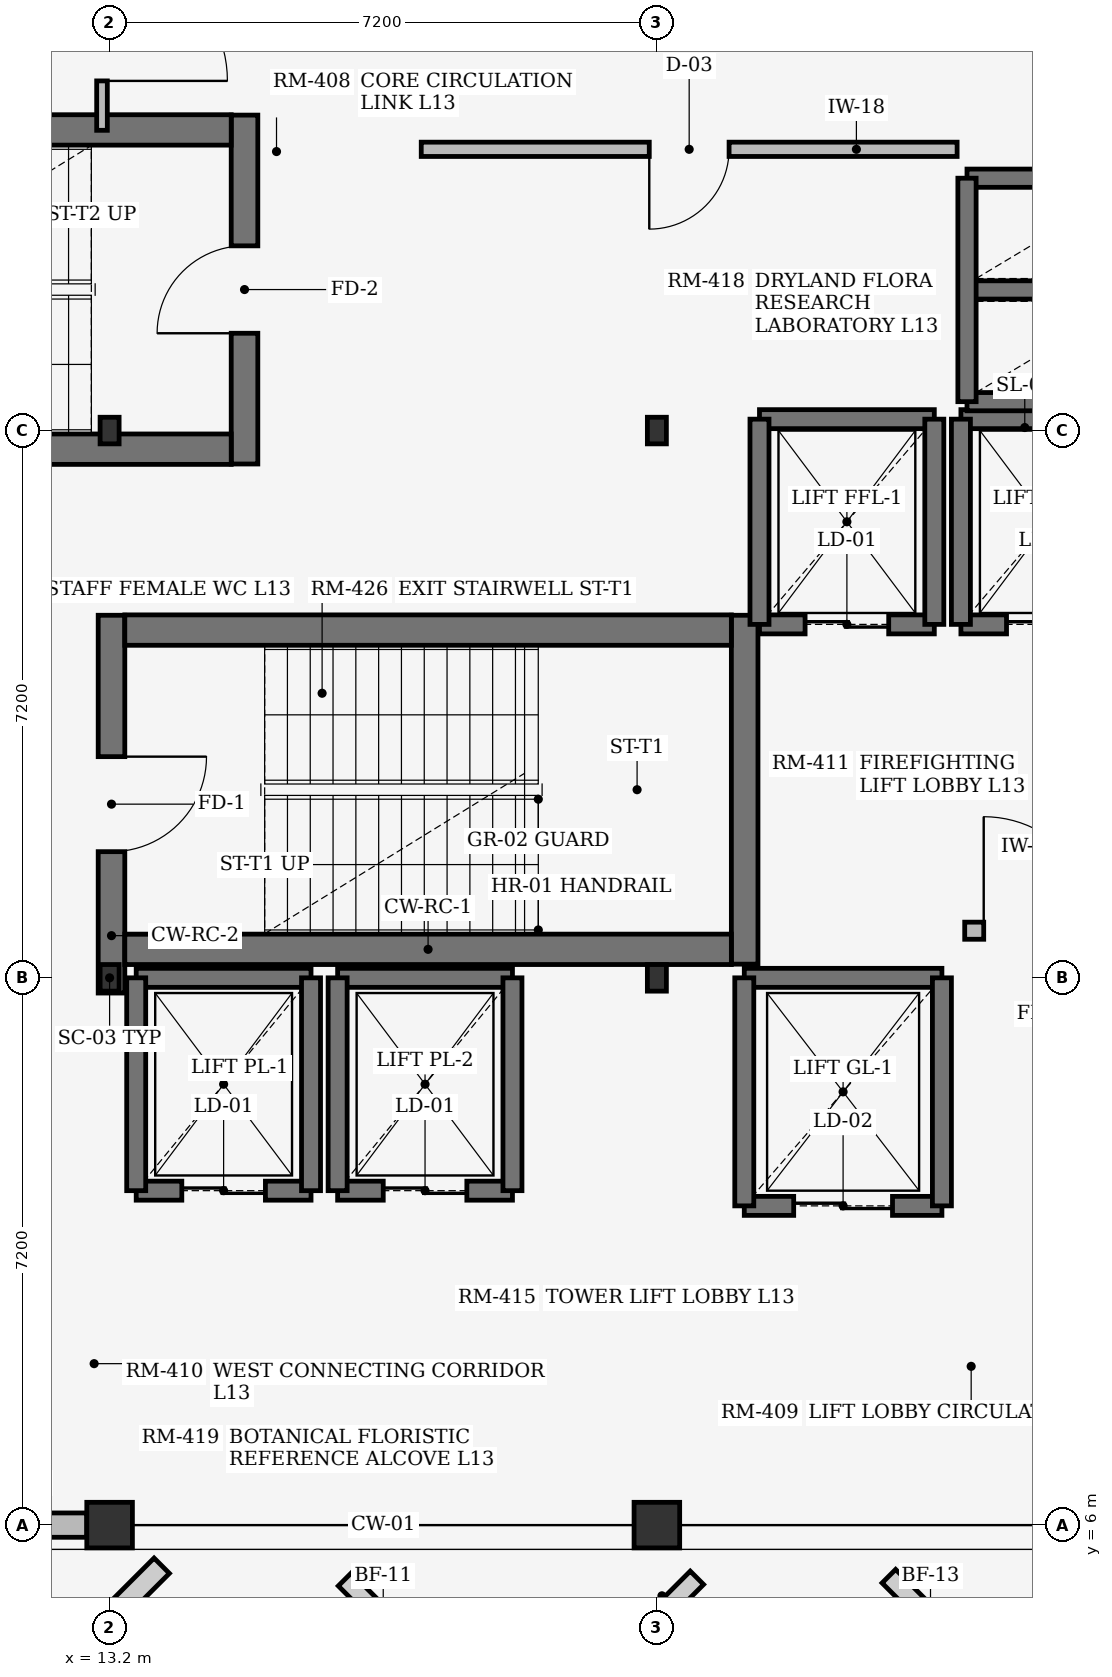
"""IFC4 building model, lengths in metres.
Left out: names, types, materials, properties, quantities, classifications, styles, units other than length and angle.
Written with IfcOpenShell. Run it as: python <this file> out.ifc"""

import sys

from ifc_helpers import new_model, si_unit, direction, frame, frame_2d, origin, origin_2d, place, context, subcontext, project, spatial, rectangle, i_section, extrude, element, fill, save


model = new_model("IFC4")
c1 = context("Model", 3, precision=1e-05, world=origin(), true_north=direction((0.0, 1.0)))
c2 = subcontext(c1, "Body", "Model", "MODEL_VIEW")
j1 = project(units=[si_unit("LENGTHUNIT", "METRE"), si_unit("PLANEANGLEUNIT", "RADIAN")], contexts=[c1])
p1 = place(None, origin())
s1 = spatial("IfcSite", under=j1, at=p1, CompositionType="ELEMENT")
p2 = place(p1, origin())
s2 = spatial("IfcBuilding", under=s1, at=p2, CompositionType="ELEMENT")
p3 = place(p2, frame((0.0, 0.0, 52.2)))
s3 = spatial("IfcBuildingStorey", under=s2, at=p3, CompositionType="ELEMENT", Elevation=52.2)
p4 = place(p3, frame((13.2, 6.0, 0.0), z_axis=(0.0, 0.0, 1.0), x_axis=(1.0, 0.0, 0.0)))
e1 = element("IfcColumn", 1, at=p4, inside=s3, PredefinedType="COLUMN", context=c2, shape_type="SweptSolid", body=[
    extrude(rectangle(XDim=0.6, YDim=0.6, at=origin_2d()), origin(), (0.0, 0.0, 1.0), 3.705),
])
for number, where, z_axis, x_axis in (
    (2, (13.2, 13.2, 0.0), (0.0, 0.0, 1.0), (1.0, 0.0, 0.0)),
    (3, (13.2, 20.4, 0.0), (0.0, 0.0, 1.0), (1.0, 0.0, 0.0)),
):
    element("IfcColumn", number, at=place(p3, frame(where, z_axis=z_axis, x_axis=x_axis)), inside=s3, PredefinedType="COLUMN", context=c2, shape_type="SweptSolid", body=[
        extrude(i_section(OverallWidth=0.25, OverallDepth=0.35, WebThickness=0.01, FlangeThickness=0.012, at=origin_2d()), origin(), (0.0, 0.0, 1.0), 3.705),
    ])
p5 = place(p3, frame((20.4, 6.0, 0.0), z_axis=(0.0, 0.0, 1.0), x_axis=(1.0, 0.0, 0.0)))
e4 = element("IfcColumn", 4, at=p5, inside=s3, PredefinedType="COLUMN", context=c2, shape_type="SweptSolid", body=[
    extrude(rectangle(XDim=0.6, YDim=0.6, at=origin_2d()), origin(), (0.0, 0.0, 1.0), 3.705),
])
for number, where, z_axis, x_axis in (
    (5, (20.4, 13.2, 0.0), (0.0, 0.0, 1.0), (1.0, 0.0, 0.0)),
    (6, (20.4, 20.4, 0.0), (0.0, 0.0, 1.0), (1.0, 0.0, 0.0)),
):
    element("IfcColumn", number, at=place(p3, frame(where, z_axis=z_axis, x_axis=x_axis)), inside=s3, PredefinedType="COLUMN", context=c2, shape_type="SweptSolid", body=[
        extrude(i_section(OverallWidth=0.25, OverallDepth=0.35, WebThickness=0.01, FlangeThickness=0.012, at=origin_2d()), origin(), (0.0, 0.0, 1.0), 3.705),
    ])
p6 = place(p3, frame((6.3, 6.0, 0.0), z_axis=(0.0, 0.0, 1.0), x_axis=(1.0, 0.0, 0.0)))
e7 = element("IfcWall", 7, at=p6, inside=s3, PredefinedType="STANDARD", context=c2, shape_type="SweptSolid", body=[
    extrude(rectangle(XDim=6.6, YDim=0.32, at=frame_2d((3.3, 0.0))), origin(), (0.0, 0.0, 1.0), 3.285),
])
p7 = place(p6, frame((2.15, 0.0, 0.75)))
e8 = element("IfcOpeningElement", 8, at=p7, cuts=e7, PredefinedType="OPENING", context=c2, shape_type="SweptSolid", body=[
    extrude(rectangle(XDim=2.3, YDim=1.35, at=frame_2d((1.15, 0.675))), frame((0.0, 0.17, 0.0), z_axis=(0.0, -1.0, 0.0), x_axis=(1.0, 0.0, 0.0)), (0.0, 0.0, 1.0), 0.34),
])
p8 = place(p3, frame((13.225, 13.0, 0.0), z_axis=(0.0, 0.0, 1.0), x_axis=(0.0, 1.0, 0.0)))
e9 = element("IfcWall", 9, at=p8, inside=s3, PredefinedType="SHEAR", context=c2, shape_type="SweptSolid", body=[
    extrude(rectangle(XDim=4.97, YDim=0.35, at=frame_2d((2.485, 0.0))), origin(), (0.0, 0.0, 1.0), 3.705),
])
p9 = place(p8, frame((1.86, 0.0, 0.0)))
e10 = element("IfcOpeningElement", 10, at=p9, cuts=e9, PredefinedType="OPENING", context=c2, shape_type="SweptSolid", body=[
    extrude(rectangle(XDim=1.25, YDim=2.2, at=frame_2d((0.625, 1.1))), frame((0.0, 0.185, 0.0), z_axis=(0.0, -1.0, 0.0), x_axis=(1.0, 0.0, 0.0)), (0.0, 0.0, 1.0), 0.37),
])
p10 = place(p3, frame((21.555, 13.38, 0.0), z_axis=(0.0, 0.0, 1.0), x_axis=(0.0, 1.0, 0.0)))
e11 = element("IfcWall", 11, at=p10, inside=s3, PredefinedType="SHEAR", context=c2, shape_type="SweptSolid", body=[
    extrude(rectangle(XDim=4.59, YDim=0.35, at=frame_2d((2.295, 0.0))), origin(), (0.0, 0.0, 1.0), 3.705),
])
for number, where, z_axis, x_axis in (
    (12, (13.4, 13.575, 0.0), (0.0, 0.0, 1.0), (1.0, 0.0, 0.0)),
    (13, (13.4, 17.775, 0.0), (0.0, 0.0, 1.0), (1.0, 0.0, 0.0)),
):
    element("IfcWall", number, at=place(p3, frame(where, z_axis=z_axis, x_axis=x_axis)), inside=s3, PredefinedType="SHEAR", context=c2, shape_type="SweptSolid", body=[
        extrude(rectangle(XDim=7.98, YDim=0.4, at=frame_2d((3.99, 0.0))), origin(), (0.0, 0.0, 1.0), 3.705),
    ])
p11 = place(p3, frame((14.975, 24.55, 0.0), z_axis=(0.0, 0.0, 1.0), x_axis=(0.0, -1.0, 0.0)))
e14 = element("IfcWall", 14, at=p11, inside=s3, PredefinedType="SHEAR", context=c2, shape_type="SweptSolid", body=[
    extrude(rectangle(XDim=4.59, YDim=0.35, at=frame_2d((2.295, 0.0))), origin(), (0.0, 0.0, 1.0), 3.705),
])
p12 = place(p11, frame((1.72, 0.0, 0.0)))
e15 = element("IfcOpeningElement", 15, at=p12, cuts=e14, PredefinedType="OPENING", context=c2, shape_type="SweptSolid", body=[
    extrude(rectangle(XDim=1.15, YDim=2.2, at=frame_2d((0.575, 1.1))), frame((0.0, 0.185, 0.0), z_axis=(0.0, -1.0, 0.0), x_axis=(1.0, 0.0, 0.0)), (0.0, 0.0, 1.0), 0.37),
])
for number, where, z_axis, x_axis in (
    (16, (14.8, 24.355, 0.0), (0.0, 0.0, 1.0), (-1.0, 0.0, 0.0)),
    (17, (14.8, 20.155, 0.0), (0.0, 0.0, 1.0), (-1.0, 0.0, 0.0)),
):
    element("IfcWall", number, at=place(p3, frame(where, z_axis=z_axis, x_axis=x_axis)), inside=s3, PredefinedType="SHEAR", context=c2, shape_type="SweptSolid", body=[
        extrude(rectangle(XDim=7.98, YDim=0.4, at=frame_2d((3.99, 0.0))), origin(), (0.0, 0.0, 1.0), 3.705),
    ])
p13 = place(p3, frame((21.75, 17.85, 0.0), z_axis=(0.0, 0.0, 1.0), x_axis=(1.0, 0.0, 0.0)))
e18 = element("IfcWall", 18, at=p13, inside=s3, PredefinedType="SHEAR", context=c2, shape_type="SweptSolid", body=[
    extrude(rectangle(XDim=2.3, YDim=0.25, at=frame_2d((1.15, 0.0))), origin(), (0.0, 0.0, 1.0), 3.705),
])
p14 = place(p13, frame((0.6, 0.0, 0.0)))
e19 = element("IfcOpeningElement", 19, at=p14, cuts=e18, PredefinedType="OPENING", context=c2, shape_type="SweptSolid", body=[
    extrude(rectangle(XDim=1.1, YDim=2.2, at=frame_2d((0.55, 1.1))), frame((0.0, 0.135, 0.0), z_axis=(0.0, -1.0, 0.0), x_axis=(1.0, 0.0, 0.0)), (0.0, 0.0, 1.0), 0.27),
])
p15 = place(p3, frame((21.75, 20.55, 0.0), z_axis=(0.0, 0.0, 1.0), x_axis=(1.0, 0.0, 0.0)))
e20 = element("IfcWall", 20, at=p15, inside=s3, PredefinedType="SHEAR", context=c2, shape_type="SweptSolid", body=[
    extrude(rectangle(XDim=2.3, YDim=0.25, at=frame_2d((1.15, 0.0))), origin(), (0.0, 0.0, 1.0), 3.705),
])
for number, where, z_axis, x_axis in (
    (21, (21.75, 17.85, 0.0), (0.0, 0.0, 1.0), (0.0, 1.0, 0.0)),
    (22, (24.05, 17.85, 0.0), (0.0, 0.0, 1.0), (0.0, 1.0, 0.0)),
):
    element("IfcWall", number, at=place(p3, frame(where, z_axis=z_axis, x_axis=x_axis)), inside=s3, PredefinedType="SHEAR", context=c2, shape_type="SweptSolid", body=[
        extrude(rectangle(XDim=2.7, YDim=0.25, at=frame_2d((1.35, 0.0))), origin(), (0.0, 0.0, 1.0), 3.705),
    ])
p16 = place(p3, frame((24.4, 17.85, 0.0), z_axis=(0.0, 0.0, 1.0), x_axis=(1.0, 0.0, 0.0)))
e23 = element("IfcWall", 23, at=p16, inside=s3, PredefinedType="SHEAR", context=c2, shape_type="SweptSolid", body=[
    extrude(rectangle(XDim=2.3, YDim=0.25, at=frame_2d((1.15, 0.0))), origin(), (0.0, 0.0, 1.0), 3.705),
])
p17 = place(p16, frame((0.6, 0.0, 0.0)))
e24 = element("IfcOpeningElement", 24, at=p17, cuts=e23, PredefinedType="OPENING", context=c2, shape_type="SweptSolid", body=[
    extrude(rectangle(XDim=1.1, YDim=2.2, at=frame_2d((0.55, 1.1))), frame((0.0, 0.135, 0.0), z_axis=(0.0, -1.0, 0.0), x_axis=(1.0, 0.0, 0.0)), (0.0, 0.0, 1.0), 0.27),
])
p18 = place(p3, frame((24.4, 20.55, 0.0), z_axis=(0.0, 0.0, 1.0), x_axis=(1.0, 0.0, 0.0)))
e25 = element("IfcWall", 25, at=p18, inside=s3, PredefinedType="SHEAR", context=c2, shape_type="SweptSolid", body=[
    extrude(rectangle(XDim=2.3, YDim=0.25, at=frame_2d((1.15, 0.0))), origin(), (0.0, 0.0, 1.0), 3.705),
])
p19 = place(p3, frame((24.4, 17.85, 0.0), z_axis=(0.0, 0.0, 1.0), x_axis=(0.0, 1.0, 0.0)))
e26 = element("IfcWall", 26, at=p19, inside=s3, PredefinedType="SHEAR", context=c2, shape_type="SweptSolid", body=[
    extrude(rectangle(XDim=2.7, YDim=0.25, at=frame_2d((1.35, 0.0))), origin(), (0.0, 0.0, 1.0), 3.705),
])
p20 = place(p3, frame((13.55, 10.4, 0.0), z_axis=(0.0, 0.0, 1.0), x_axis=(1.0, 0.0, 0.0)))
e27 = element("IfcWall", 27, at=p20, inside=s3, PredefinedType="SHEAR", context=c2, shape_type="SweptSolid", body=[
    extrude(rectangle(XDim=2.3, YDim=0.25, at=frame_2d((1.15, 0.0))), origin(), (0.0, 0.0, 1.0), 3.705),
])
p21 = place(p20, frame((0.6, 0.0, 0.0)))
e28 = element("IfcOpeningElement", 28, at=p21, cuts=e27, PredefinedType="OPENING", context=c2, shape_type="SweptSolid", body=[
    extrude(rectangle(XDim=1.1, YDim=2.2, at=frame_2d((0.55, 1.1))), frame((0.0, 0.135, 0.0), z_axis=(0.0, -1.0, 0.0), x_axis=(1.0, 0.0, 0.0)), (0.0, 0.0, 1.0), 0.27),
])
p22 = place(p3, frame((13.55, 13.2, 0.0), z_axis=(0.0, 0.0, 1.0), x_axis=(1.0, 0.0, 0.0)))
e29 = element("IfcWall", 29, at=p22, inside=s3, PredefinedType="SHEAR", context=c2, shape_type="SweptSolid", body=[
    extrude(rectangle(XDim=2.3, YDim=0.25, at=frame_2d((1.15, 0.0))), origin(), (0.0, 0.0, 1.0), 3.705),
])
for number, where, z_axis, x_axis in (
    (30, (13.55, 10.4, 0.0), (0.0, 0.0, 1.0), (0.0, 1.0, 0.0)),
    (31, (15.85, 10.4, 0.0), (0.0, 0.0, 1.0), (0.0, 1.0, 0.0)),
):
    element("IfcWall", number, at=place(p3, frame(where, z_axis=z_axis, x_axis=x_axis)), inside=s3, PredefinedType="SHEAR", context=c2, shape_type="SweptSolid", body=[
        extrude(rectangle(XDim=2.8, YDim=0.25, at=frame_2d((1.4, 0.0))), origin(), (0.0, 0.0, 1.0), 3.705),
    ])
p23 = place(p3, frame((16.2, 10.4, 0.0), z_axis=(0.0, 0.0, 1.0), x_axis=(1.0, 0.0, 0.0)))
e32 = element("IfcWall", 32, at=p23, inside=s3, PredefinedType="SHEAR", context=c2, shape_type="SweptSolid", body=[
    extrude(rectangle(XDim=2.3, YDim=0.25, at=frame_2d((1.15, 0.0))), origin(), (0.0, 0.0, 1.0), 3.705),
])
p24 = place(p23, frame((0.6, 0.0, 0.0)))
e33 = element("IfcOpeningElement", 33, at=p24, cuts=e32, PredefinedType="OPENING", context=c2, shape_type="SweptSolid", body=[
    extrude(rectangle(XDim=1.1, YDim=2.2, at=frame_2d((0.55, 1.1))), frame((0.0, 0.135, 0.0), z_axis=(0.0, -1.0, 0.0), x_axis=(1.0, 0.0, 0.0)), (0.0, 0.0, 1.0), 0.27),
])
p25 = place(p3, frame((16.2, 13.2, 0.0), z_axis=(0.0, 0.0, 1.0), x_axis=(1.0, 0.0, 0.0)))
e34 = element("IfcWall", 34, at=p25, inside=s3, PredefinedType="SHEAR", context=c2, shape_type="SweptSolid", body=[
    extrude(rectangle(XDim=2.3, YDim=0.25, at=frame_2d((1.15, 0.0))), origin(), (0.0, 0.0, 1.0), 3.705),
])
for number, where, z_axis, x_axis in (
    (35, (16.2, 10.4, 0.0), (0.0, 0.0, 1.0), (0.0, 1.0, 0.0)),
    (36, (18.5, 10.4, 0.0), (0.0, 0.0, 1.0), (0.0, 1.0, 0.0)),
):
    element("IfcWall", number, at=place(p3, frame(where, z_axis=z_axis, x_axis=x_axis)), inside=s3, PredefinedType="SHEAR", context=c2, shape_type="SweptSolid", body=[
        extrude(rectangle(XDim=2.8, YDim=0.25, at=frame_2d((1.4, 0.0))), origin(), (0.0, 0.0, 1.0), 3.705),
    ])
p26 = place(p3, frame((21.55, 10.2, 0.0), z_axis=(0.0, 0.0, 1.0), x_axis=(1.0, 0.0, 0.0)))
e37 = element("IfcWall", 37, at=p26, inside=s3, PredefinedType="SHEAR", context=c2, shape_type="SweptSolid", body=[
    extrude(rectangle(XDim=2.6, YDim=0.25, at=frame_2d((1.3, 0.0))), origin(), (0.0, 0.0, 1.0), 3.705),
])
p27 = place(p26, frame((0.65, 0.0, 0.0)))
e38 = element("IfcOpeningElement", 38, at=p27, cuts=e37, PredefinedType="OPENING", context=c2, shape_type="SweptSolid", body=[
    extrude(rectangle(XDim=1.3, YDim=2.25, at=frame_2d((0.65, 1.125))), frame((0.0, 0.135, 0.0), z_axis=(0.0, -1.0, 0.0), x_axis=(1.0, 0.0, 0.0)), (0.0, 0.0, 1.0), 0.27),
])
p28 = place(p3, frame((21.55, 13.2, 0.0), z_axis=(0.0, 0.0, 1.0), x_axis=(1.0, 0.0, 0.0)))
e39 = element("IfcWall", 39, at=p28, inside=s3, PredefinedType="SHEAR", context=c2, shape_type="SweptSolid", body=[
    extrude(rectangle(XDim=2.6, YDim=0.25, at=frame_2d((1.3, 0.0))), origin(), (0.0, 0.0, 1.0), 3.705),
])
for number, where, z_axis, x_axis in (
    (40, (21.55, 10.2, 0.0), (0.0, 0.0, 1.0), (0.0, 1.0, 0.0)),
    (41, (24.15, 10.2, 0.0), (0.0, 0.0, 1.0), (0.0, 1.0, 0.0)),
):
    element("IfcWall", number, at=place(p3, frame(where, z_axis=z_axis, x_axis=x_axis)), inside=s3, PredefinedType="SHEAR", context=c2, shape_type="SweptSolid", body=[
        extrude(rectangle(XDim=3.0, YDim=0.25, at=frame_2d((1.5, 0.0))), origin(), (0.0, 0.0, 1.0), 3.705),
    ])
for number, where, z_axis, x_axis in (
    (42, (24.48, 20.78, 0.0), (0.0, 0.0, 1.0), (1.0, 0.0, 0.0)),
    (43, (24.48, 22.25, 0.0), (0.0, 0.0, 1.0), (1.0, 0.0, 0.0)),
    (44, (24.48, 23.72, 0.0), (0.0, 0.0, 1.0), (1.0, 0.0, 0.0)),
):
    element("IfcWall", number, at=place(p3, frame(where, z_axis=z_axis, x_axis=x_axis)), inside=s3, PredefinedType="SHEAR", context=c2, shape_type="SweptSolid", body=[
        extrude(rectangle(XDim=2.24, YDim=0.24, at=frame_2d((1.12, 0.0))), origin(), (0.0, 0.0, 1.0), 3.705),
    ])
p29 = place(p3, frame((24.48, 20.78, 0.0), z_axis=(0.0, 0.0, 1.0), x_axis=(0.0, 1.0, 0.0)))
e45 = element("IfcWall", 45, at=p29, inside=s3, PredefinedType="SHEAR", context=c2, shape_type="SweptSolid", body=[
    extrude(rectangle(XDim=2.94, YDim=0.24, at=frame_2d((1.47, 0.0))), origin(), (0.0, 0.0, 1.0), 3.705),
])
p30 = place(p3, frame((24.45, 13.82, 0.0), z_axis=(0.0, 0.0, 1.0), x_axis=(1.0, 0.0, 0.0)))
e46 = element("IfcWall", 46, at=p30, inside=s3, PredefinedType="SOLIDWALL", context=c2, shape_type="SweptSolid", body=[
    extrude(rectangle(XDim=2.0, YDim=0.225, at=frame_2d((1.0, 0.0))), origin(), (0.0, 0.0, 1.0), 3.685),
])
p31 = place(p30, frame((0.25, 0.0, 0.0)))
e47 = element("IfcOpeningElement", 47, at=p31, cuts=e46, PredefinedType="OPENING", context=c2, shape_type="SweptSolid", body=[
    extrude(rectangle(XDim=1.5, YDim=2.2, at=frame_2d((0.75, 1.1))), frame((0.0, 0.123, 0.0), z_axis=(0.0, -1.0, 0.0), x_axis=(1.0, 0.0, 0.0)), (0.0, 0.0, 1.0), 0.245),
])
p32 = place(p3, frame((17.3, 24.1, 0.0), z_axis=(0.0, 0.0, 1.0), x_axis=(1.0, 0.0, 0.0)))
e48 = element("IfcWall", 48, at=p32, inside=s3, PredefinedType="PARTITIONING", context=c2, shape_type="SweptSolid", body=[
    extrude(rectangle(XDim=7.05, YDim=0.188, at=frame_2d((3.525, 0.0))), origin(), (0.0, 0.0, 1.0), 3.685),
])
p33 = place(p32, frame((3.0, 0.0, 0.0)))
e49 = element("IfcOpeningElement", 49, at=p33, cuts=e48, PredefinedType="OPENING", context=c2, shape_type="SweptSolid", body=[
    extrude(rectangle(XDim=1.05, YDim=2.15, at=frame_2d((0.525, 1.075))), frame((0.0, 0.104, 0.0), z_axis=(0.0, -1.0, 0.0), x_axis=(1.0, 0.0, 0.0)), (0.0, 0.0, 1.0), 0.208),
])
p34 = place(p3, frame((13.1, 24.35, 0.0), z_axis=(0.0, 0.0, 1.0), x_axis=(0.0, 1.0, 0.0)))
e50 = element("IfcWall", 50, at=p34, inside=s3, PredefinedType="PARTITIONING", context=c2, shape_type="SweptSolid", body=[
    extrude(rectangle(XDim=2.95, YDim=0.14, at=frame_2d((1.475, 0.0))), origin(), (0.0, 0.0, 1.0), 3.295),
])
p35 = place(p34, frame((0.65, 0.0, 0.0)))
e51 = element("IfcOpeningElement", 51, at=p35, cuts=e50, PredefinedType="OPENING", context=c2, shape_type="SweptSolid", body=[
    extrude(rectangle(XDim=1.65, YDim=2.25, at=frame_2d((0.825, 1.125))), frame((0.0, 0.08, 0.0), z_axis=(0.0, -1.0, 0.0), x_axis=(1.0, 0.0, 0.0)), (0.0, 0.0, 1.0), 0.16),
])
p36 = place(p9, origin())
e52 = element("IfcDoor", 52, at=p36, inside=s3, OperationType="SINGLE_SWING_RIGHT", PredefinedType="DOOR", context=c2, shape_type="SweptSolid", body=[
    extrude(rectangle(XDim=1.25, YDim=2.2, at=frame_2d((0.625, 1.1))), frame((0.0, 0.025, 0.0), z_axis=(0.0, -1.0, 0.0), x_axis=(1.0, 0.0, 0.0)), (0.0, 0.0, 1.0), 0.05),
])
fill(e10, e52)
p37 = place(p12, origin())
e53 = element("IfcDoor", 53, at=p37, inside=s3, OperationType="SINGLE_SWING_RIGHT", PredefinedType="DOOR", context=c2, shape_type="SweptSolid", body=[
    extrude(rectangle(XDim=1.15, YDim=2.2, at=frame_2d((0.575, 1.1))), frame((0.0, 0.025, 0.0), z_axis=(0.0, -1.0, 0.0), x_axis=(1.0, 0.0, 0.0)), (0.0, 0.0, 1.0), 0.05),
])
fill(e15, e53)
p38 = place(p14, origin())
e54 = element("IfcDoor", 54, at=p38, inside=s3, OperationType="DOUBLE_DOOR_SLIDING", PredefinedType="DOOR", context=c2, shape_type="SweptSolid", body=[
    extrude(rectangle(XDim=1.1, YDim=2.2, at=frame_2d((0.55, 1.1))), frame((0.0, 0.025, 0.0), z_axis=(0.0, -1.0, 0.0), x_axis=(1.0, 0.0, 0.0)), (0.0, 0.0, 1.0), 0.05),
])
fill(e19, e54)
p39 = place(p17, origin())
e55 = element("IfcDoor", 55, at=p39, inside=s3, OperationType="DOUBLE_DOOR_SLIDING", PredefinedType="DOOR", context=c2, shape_type="SweptSolid", body=[
    extrude(rectangle(XDim=1.1, YDim=2.2, at=frame_2d((0.55, 1.1))), frame((0.0, 0.025, 0.0), z_axis=(0.0, -1.0, 0.0), x_axis=(1.0, 0.0, 0.0)), (0.0, 0.0, 1.0), 0.05),
])
fill(e24, e55)
p40 = place(p21, origin())
e56 = element("IfcDoor", 56, at=p40, inside=s3, OperationType="DOUBLE_DOOR_SLIDING", PredefinedType="DOOR", context=c2, shape_type="SweptSolid", body=[
    extrude(rectangle(XDim=1.1, YDim=2.2, at=frame_2d((0.55, 1.1))), frame((0.0, 0.025, 0.0), z_axis=(0.0, -1.0, 0.0), x_axis=(1.0, 0.0, 0.0)), (0.0, 0.0, 1.0), 0.05),
])
fill(e28, e56)
p41 = place(p24, origin())
e57 = element("IfcDoor", 57, at=p41, inside=s3, OperationType="DOUBLE_DOOR_SLIDING", PredefinedType="DOOR", context=c2, shape_type="SweptSolid", body=[
    extrude(rectangle(XDim=1.1, YDim=2.2, at=frame_2d((0.55, 1.1))), frame((0.0, 0.025, 0.0), z_axis=(0.0, -1.0, 0.0), x_axis=(1.0, 0.0, 0.0)), (0.0, 0.0, 1.0), 0.05),
])
fill(e33, e57)
p42 = place(p27, origin())
e58 = element("IfcDoor", 58, at=p42, inside=s3, OperationType="DOUBLE_DOOR_SLIDING", PredefinedType="DOOR", context=c2, shape_type="SweptSolid", body=[
    extrude(rectangle(XDim=1.3, YDim=2.25, at=frame_2d((0.65, 1.125))), frame((0.0, 0.025, 0.0), z_axis=(0.0, -1.0, 0.0), x_axis=(1.0, 0.0, 0.0)), (0.0, 0.0, 1.0), 0.05),
])
fill(e38, e58)
p43 = place(p31, origin())
e59 = element("IfcDoor", 59, at=p43, inside=s3, OperationType="SINGLE_SWING_LEFT", PredefinedType="DOOR", context=c2, shape_type="SweptSolid", body=[
    extrude(rectangle(XDim=1.5, YDim=2.2, at=frame_2d((0.75, 1.1))), frame((0.0, 0.025, 0.0), z_axis=(0.0, -1.0, 0.0), x_axis=(1.0, 0.0, 0.0)), (0.0, 0.0, 1.0), 0.05),
])
fill(e47, e59)
p44 = place(p33, frame((1.05, 0.0, 0.0), z_axis=(0.0, 0.0, 1.0), x_axis=(-1.0, 0.0, 0.0)))
e60 = element("IfcDoor", 60, at=p44, inside=s3, OperationType="SINGLE_SWING_LEFT", PredefinedType="DOOR", context=c2, shape_type="SweptSolid", body=[
    extrude(rectangle(XDim=1.05, YDim=2.15, at=frame_2d((0.525, 1.075))), frame((0.0, 0.025, 0.0), z_axis=(0.0, -1.0, 0.0), x_axis=(1.0, 0.0, 0.0)), (0.0, 0.0, 1.0), 0.05),
])
fill(e49, e60)
p45 = place(p35, frame((1.65, 0.0, 0.0), z_axis=(0.0, 0.0, 1.0), x_axis=(-1.0, 0.0, 0.0)))
e61 = element("IfcDoor", 61, at=p45, inside=s3, OperationType="DOUBLE_DOOR_SINGLE_SWING", PredefinedType="DOOR", context=c2, shape_type="SweptSolid", body=[
    extrude(rectangle(XDim=1.65, YDim=2.25, at=frame_2d((0.825, 1.125))), frame((0.0, 0.025, 0.0), z_axis=(0.0, -1.0, 0.0), x_axis=(1.0, 0.0, 0.0)), (0.0, 0.0, 1.0), 0.05),
])
fill(e51, e61)
save(model, sys.argv[1])
